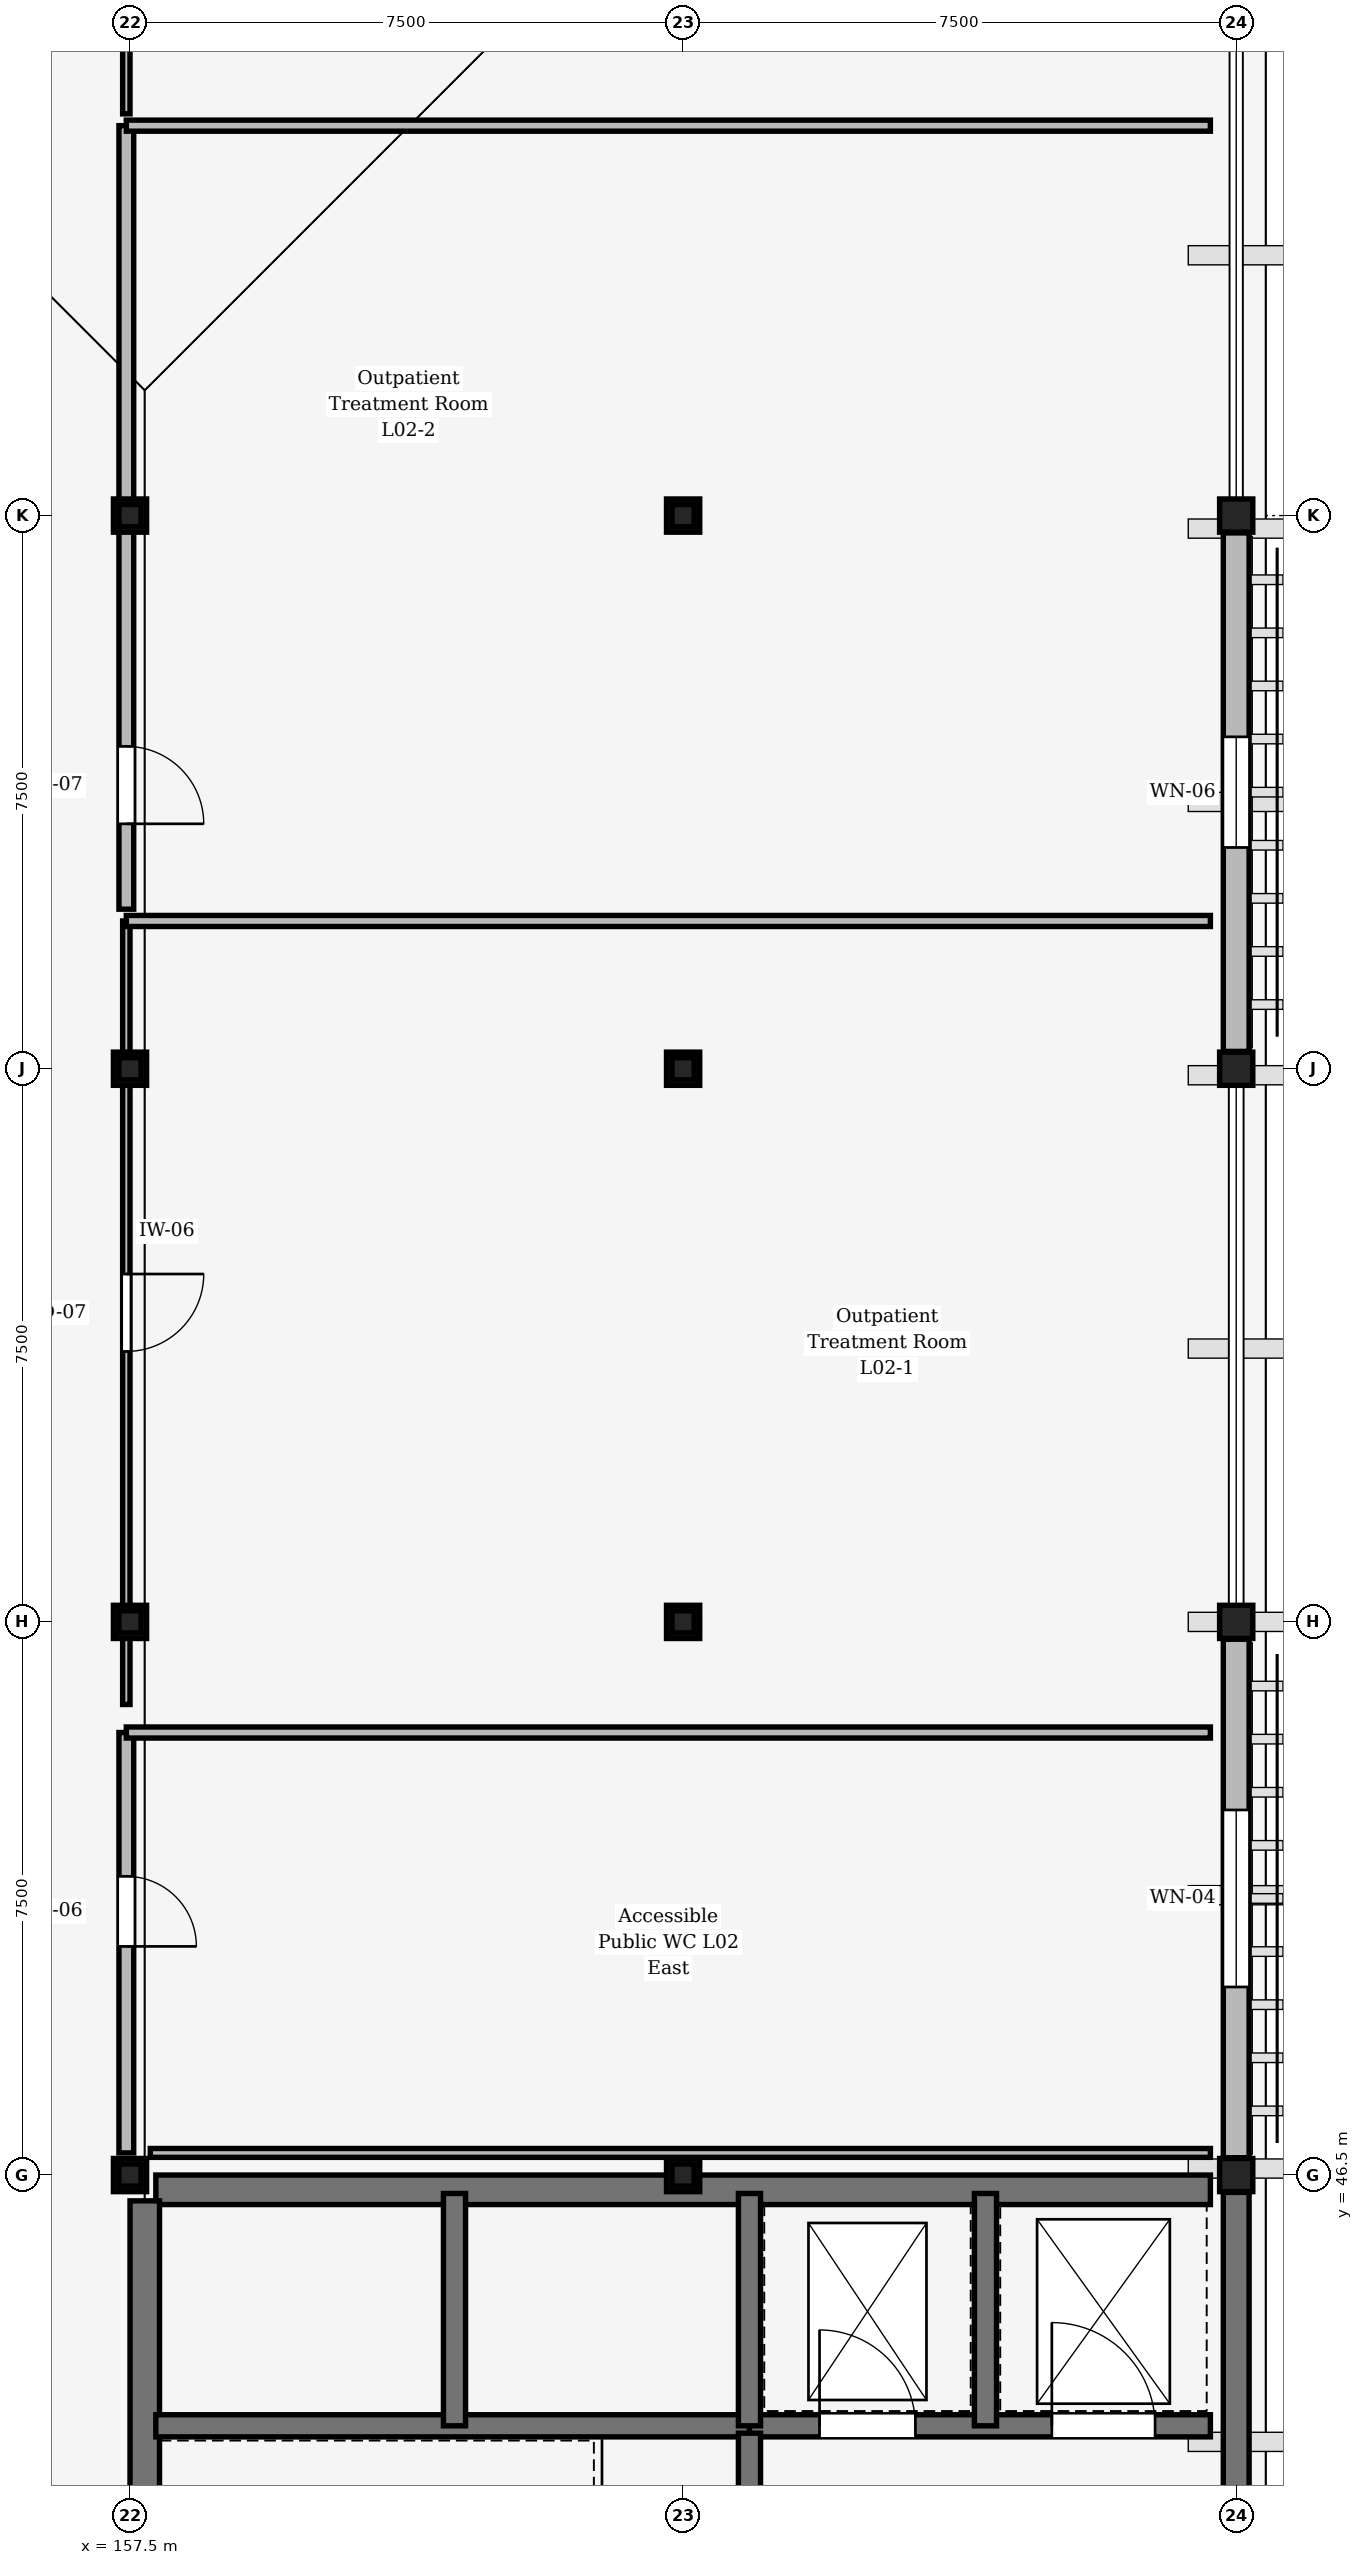
"""IFC4 building model, lengths in metres.
Left out: names, types, materials, properties, quantities, classifications, styles, units other than length and angle.
Written with IfcOpenShell. Run it as: python <this file> out.ifc"""

import sys

from ifc_helpers import new_model, si_unit, direction, frame, frame_2d, origin, origin_2d, place, context, subcontext, project, spatial, rectangle, i_section, extrude, element, fill, save


model = new_model("IFC4")
c1 = context("Model", 3, precision=1e-05, world=origin(), true_north=direction((0.0, 1.0)))
c2 = subcontext(c1, "Body", "Model", "MODEL_VIEW")
j1 = project(units=[si_unit("LENGTHUNIT", "METRE"), si_unit("PLANEANGLEUNIT", "RADIAN")], contexts=[c1])
p1 = place(None, origin())
s1 = spatial("IfcSite", under=j1, at=p1, CompositionType="ELEMENT")
p2 = place(p1, origin())
s2 = spatial("IfcBuilding", under=s1, at=p2, CompositionType="ELEMENT")
p3 = place(p2, frame((0.0, 0.0, 9.3)))
s3 = spatial("IfcBuildingStorey", under=s2, at=p3, CompositionType="ELEMENT", Elevation=9.3)
for number, where, z_axis, x_axis in (
    (1, (157.5, 46.5, 0.0), (0.0, 0.0, 1.0), (1.0, 0.0, 0.0)),
    (2, (157.5, 54.0, 0.0), (0.0, 0.0, 1.0), (1.0, 0.0, 0.0)),
    (3, (157.5, 61.5, 0.0), (0.0, 0.0, 1.0), (1.0, 0.0, 0.0)),
    (4, (157.5, 69.0, 0.0), (0.0, 0.0, 1.0), (1.0, 0.0, 0.0)),
    (5, (165.0, 46.5, 0.0), (0.0, 0.0, 1.0), (1.0, 0.0, 0.0)),
    (6, (165.0, 54.0, 0.0), (0.0, 0.0, 1.0), (1.0, 0.0, 0.0)),
    (7, (165.0, 61.5, 0.0), (0.0, 0.0, 1.0), (1.0, 0.0, 0.0)),
    (8, (165.0, 69.0, 0.0), (0.0, 0.0, 1.0), (1.0, 0.0, 0.0)),
    (9, (172.5, 46.5, 0.0), (0.0, 0.0, 1.0), (1.0, 0.0, 0.0)),
    (10, (172.5, 54.0, 0.0), (0.0, 0.0, 1.0), (1.0, 0.0, 0.0)),
    (11, (172.5, 61.5, 0.0), (0.0, 0.0, 1.0), (1.0, 0.0, 0.0)),
    (12, (172.5, 69.0, 0.0), (0.0, 0.0, 1.0), (1.0, 0.0, 0.0)),
):
    element("IfcColumn", number, at=place(p3, frame(where, z_axis=z_axis, x_axis=x_axis)), inside=s3, PredefinedType="COLUMN", context=c2, shape_type="SweptSolid", body=[
        extrude(rectangle(XDim=0.45, YDim=0.45, at=origin_2d()), origin(), (0.0, 0.0, 1.0), 4.8),
    ])
for number, where, z_axis, x_axis in (
    (13, (157.5, 46.5, 4.8), (0.0, 0.0, 1.0), (1.0, 0.0, 0.0)),
    (14, (157.5, 54.0, 4.8), (0.0, 0.0, 1.0), (1.0, 0.0, 0.0)),
    (15, (157.5, 61.5, 4.8), (0.0, 0.0, 1.0), (1.0, 0.0, 0.0)),
    (16, (157.5, 69.0, 4.8), (0.0, 0.0, 1.0), (1.0, 0.0, 0.0)),
):
    element("IfcColumn", number, at=place(p3, frame(where, z_axis=z_axis, x_axis=x_axis)), inside=s3, PredefinedType="COLUMN", context=c2, shape_type="SweptSolid", body=[
        extrude(i_section(OverallWidth=0.3, OverallDepth=0.3, WebThickness=0.011, FlangeThickness=0.019, FilletRadius=0.027, at=origin_2d()), origin(), (0.0, 0.0, 1.0), 3.714),
    ])
for number, where, z_axis, x_axis in (
    (17, (165.0, 46.5, 4.8), (0.0, 0.0, 1.0), (1.0, 0.0, 0.0)),
    (18, (165.0, 54.0, 4.8), (0.0, 0.0, 1.0), (1.0, 0.0, 0.0)),
    (19, (165.0, 61.5, 4.8), (0.0, 0.0, 1.0), (1.0, 0.0, 0.0)),
    (20, (165.0, 69.0, 4.8), (0.0, 0.0, 1.0), (1.0, 0.0, 0.0)),
):
    element("IfcColumn", number, at=place(p3, frame(where, z_axis=z_axis, x_axis=x_axis)), inside=s3, PredefinedType="COLUMN", context=c2, shape_type="SweptSolid", body=[
        extrude(i_section(OverallWidth=0.3, OverallDepth=0.3, WebThickness=0.011, FlangeThickness=0.019, FilletRadius=0.027, at=origin_2d()), origin(), (0.0, 0.0, 1.0), 1.97),
    ])
p4 = place(p3, frame((172.5, 46.265, 0.0), z_axis=(0.0, 0.0, 1.0), x_axis=(0.0, -1.0, 0.0)))
e21 = element("IfcWall", 21, at=p4, inside=s3, PredefinedType="SHEAR", context=c2, shape_type="SweptSolid", body=[
    extrude(rectangle(XDim=7.03, YDim=0.35, at=frame_2d((3.515, 0.0))), origin(), (0.0, 0.0, 1.0), 4.55),
])
p5 = place(p3, frame((172.5, 53.765, 0.0), z_axis=(0.0, 0.0, 1.0), x_axis=(0.0, -1.0, 0.0)))
e22 = element("IfcWall", 22, at=p5, inside=s3, PredefinedType="STANDARD", context=c2, shape_type="SweptSolid", body=[
    extrude(rectangle(XDim=7.03, YDim=0.35, at=frame_2d((3.515, 0.0))), origin(), (0.0, 0.0, 1.0), 4.55),
])
p6 = place(p5, frame((2.315, 0.0, 0.9)))
e23 = element("IfcOpeningElement", 23, at=p6, cuts=e22, PredefinedType="OPENING", context=c2, shape_type="SweptSolid", body=[
    extrude(rectangle(XDim=2.4, YDim=2.5, at=frame_2d((1.2, 1.25))), frame((0.0, 0.185, 0.0), z_axis=(0.0, -1.0, 0.0), x_axis=(1.0, 0.0, 0.0)), (0.0, 0.0, 1.0), 0.37),
])
p7 = place(p3, frame((172.5, 68.765, 0.0), z_axis=(0.0, 0.0, 1.0), x_axis=(0.0, -1.0, 0.0)))
e24 = element("IfcWall", 24, at=p7, inside=s3, PredefinedType="STANDARD", context=c2, shape_type="SweptSolid", body=[
    extrude(rectangle(XDim=7.03, YDim=0.35, at=frame_2d((3.515, 0.0))), origin(), (0.0, 0.0, 1.0), 4.55),
])
p8 = place(p7, frame((2.765, 0.0, 0.9)))
e25 = element("IfcOpeningElement", 25, at=p8, cuts=e24, PredefinedType="OPENING", context=c2, shape_type="SweptSolid", body=[
    extrude(rectangle(XDim=1.5, YDim=2.1, at=frame_2d((0.75, 1.05))), frame((0.0, 0.185, 0.0), z_axis=(0.0, -1.0, 0.0), x_axis=(1.0, 0.0, 0.0)), (0.0, 0.0, 1.0), 0.37),
])
p9 = place(p3, frame((157.85, 46.3, 0.0), z_axis=(0.0, 0.0, 1.0), x_axis=(1.0, 0.0, 0.0)))
e26 = element("IfcWall", 26, at=p9, inside=s3, PredefinedType="SHEAR", context=c2, shape_type="SweptSolid", body=[
    extrude(rectangle(XDim=14.3, YDim=0.4, at=frame_2d((7.15, 0.0))), origin(), (0.0, 0.0, 1.0), 4.55),
])
p10 = place(p3, frame((157.7, 39.35, 0.0), z_axis=(0.0, 0.0, 1.0), x_axis=(0.0, 1.0, 0.0)))
e27 = element("IfcWall", 27, at=p10, inside=s3, PredefinedType="SHEAR", context=c2, shape_type="SweptSolid", body=[
    extrude(rectangle(XDim=6.8, YDim=0.4, at=frame_2d((3.4, 0.0))), origin(), (0.0, 0.0, 1.0), 4.55),
])
p11 = place(p3, frame((157.85, 43.1, 0.0), z_axis=(0.0, 0.0, 1.0), x_axis=(1.0, 0.0, 0.0)))
e28 = element("IfcWall", 28, at=p11, inside=s3, PredefinedType="SHEAR", context=c2, shape_type="SweptSolid", body=[
    extrude(rectangle(XDim=8.05, YDim=0.3, at=frame_2d((4.025, 0.0))), origin(), (0.0, 0.0, 1.0), 4.55),
])
p12 = place(p3, frame((165.9, 43.1, 0.0), z_axis=(0.0, 0.0, 1.0), x_axis=(1.0, 0.0, 0.0)))
e29 = element("IfcWall", 29, at=p12, inside=s3, PredefinedType="SHEAR", context=c2, shape_type="SweptSolid", body=[
    extrude(rectangle(XDim=6.25, YDim=0.3, at=frame_2d((3.125, 0.0))), origin(), (0.0, 0.0, 1.0), 4.55),
])
p13 = place(p12, frame((0.95, 0.0, 0.0)))
e30 = element("IfcOpeningElement", 30, at=p13, cuts=e29, PredefinedType="OPENING", context=c2, shape_type="SweptSolid", body=[
    extrude(rectangle(XDim=1.3, YDim=2.2, at=frame_2d((0.65, 1.1))), frame((0.0, 0.16, 0.0), z_axis=(0.0, -1.0, 0.0), x_axis=(1.0, 0.0, 0.0)), (0.0, 0.0, 1.0), 0.32),
])
p14 = place(p12, frame((4.1, 0.0, 0.0)))
e31 = element("IfcOpeningElement", 31, at=p14, cuts=e29, PredefinedType="OPENING", context=c2, shape_type="SweptSolid", body=[
    extrude(rectangle(XDim=1.4, YDim=2.25, at=frame_2d((0.7, 1.125))), frame((0.0, 0.16, 0.0), z_axis=(0.0, -1.0, 0.0), x_axis=(1.0, 0.0, 0.0)), (0.0, 0.0, 1.0), 0.32),
])
p15 = place(p3, frame((165.9, 43.0, 0.0), z_axis=(0.0, 0.0, 1.0), x_axis=(0.0, -1.0, 0.0)))
e32 = element("IfcWall", 32, at=p15, inside=s3, PredefinedType="SHEAR", context=c2, shape_type="SweptSolid", body=[
    extrude(rectangle(XDim=3.65, YDim=0.3, at=frame_2d((1.825, 0.0))), origin(), (0.0, 0.0, 1.0), 4.55),
])
p16 = place(p15, frame((1.22, 0.0, 0.0)))
e33 = element("IfcOpeningElement", 33, at=p16, cuts=e32, PredefinedType="OPENING", context=c2, shape_type="SweptSolid", body=[
    extrude(rectangle(XDim=1.2, YDim=2.25, at=frame_2d((0.6, 1.125))), frame((0.0, 0.16, 0.0), z_axis=(0.0, -1.0, 0.0), x_axis=(1.0, 0.0, 0.0)), (0.0, 0.0, 1.0), 0.32),
])
for number, where, z_axis, x_axis in (
    (34, (161.9, 43.1, 0.0), (0.0, 0.0, 1.0), (0.0, 1.0, 0.0)),
    (35, (165.9, 43.1, 0.0), (0.0, 0.0, 1.0), (0.0, 1.0, 0.0)),
    (36, (169.1, 43.1, 0.0), (0.0, 0.0, 1.0), (0.0, 1.0, 0.0)),
):
    element("IfcWall", number, at=place(p3, frame(where, z_axis=z_axis, x_axis=x_axis)), inside=s3, PredefinedType="SHEAR", context=c2, shape_type="SweptSolid", body=[
        extrude(rectangle(XDim=3.15, YDim=0.3, at=frame_2d((1.575, 0.0))), origin(), (0.0, 0.0, 1.0), 4.55),
    ])
p17 = place(p3, frame((157.45, 52.5, 0.0), z_axis=(0.0, 0.0, 1.0), x_axis=(0.0, -1.0, 0.0)))
e37 = element("IfcWall", 37, at=p17, inside=s3, PredefinedType="STANDARD", context=c2, shape_type="SweptSolid", body=[
    extrude(rectangle(XDim=5.7, YDim=0.2, at=frame_2d((2.85, 0.0))), origin(), (0.0, 0.0, 1.0), 4.535),
])
p18 = place(p17, frame((1.95, 0.0, 0.0)))
e38 = element("IfcOpeningElement", 38, at=p18, cuts=e37, PredefinedType="OPENING", context=c2, shape_type="SweptSolid", body=[
    extrude(rectangle(XDim=0.95, YDim=2.15, at=frame_2d((0.475, 1.075))), frame((0.0, 0.11, 0.0), z_axis=(0.0, -1.0, 0.0), x_axis=(1.0, 0.0, 0.0)), (0.0, 0.0, 1.0), 0.22),
])
p19 = place(p3, frame((157.45, 63.503, 0.0), z_axis=(0.0, 0.0, 1.0), x_axis=(0.0, -1.0, 0.0)))
e39 = element("IfcWall", 39, at=p19, inside=s3, PredefinedType="PARTITIONING", context=c2, shape_type="SweptSolid", body=[
    extrude(rectangle(XDim=10.624, YDim=0.1, at=frame_2d((5.312, 0.0))), origin(), (0.0, 0.0, 1.0), 4.535),
])
p20 = place(p19, frame((4.787, 0.0, 0.0)))
e40 = element("IfcOpeningElement", 40, at=p20, cuts=e39, PredefinedType="OPENING", context=c2, shape_type="SweptSolid", body=[
    extrude(rectangle(XDim=1.05, YDim=2.2, at=frame_2d((0.525, 1.1))), frame((0.0, 0.06, 0.0), z_axis=(0.0, -1.0, 0.0), x_axis=(1.0, 0.0, 0.0)), (0.0, 0.0, 1.0), 0.12),
])
p21 = place(p3, frame((157.45, 74.287, 0.0), z_axis=(0.0, 0.0, 1.0), x_axis=(0.0, -1.0, 0.0)))
e41 = element("IfcWall", 41, at=p21, inside=s3, PredefinedType="STANDARD", context=c2, shape_type="SweptSolid", body=[
    extrude(rectangle(XDim=10.623, YDim=0.2, at=frame_2d((5.312, 0.0))), origin(), (0.0, 0.0, 1.0), 4.535),
])
p22 = place(p21, frame((8.416, 0.0, 0.0)))
e42 = element("IfcOpeningElement", 42, at=p22, cuts=e41, PredefinedType="OPENING", context=c2, shape_type="SweptSolid", body=[
    extrude(rectangle(XDim=1.05, YDim=2.2, at=frame_2d((0.525, 1.1))), frame((0.0, 0.11, 0.0), z_axis=(0.0, -1.0, 0.0), x_axis=(1.0, 0.0, 0.0)), (0.0, 0.0, 1.0), 0.22),
])
p23 = place(p3, frame((157.45, 85.07, 0.0), z_axis=(0.0, 0.0, 1.0), x_axis=(0.0, -1.0, 0.0)))
e43 = element("IfcWall", 43, at=p23, inside=s3, PredefinedType="PARTITIONING", context=c2, shape_type="SweptSolid", body=[
    extrude(rectangle(XDim=10.623, YDim=0.1, at=frame_2d((5.312, 0.0))), origin(), (0.0, 0.0, 1.0), 4.535),
])
p24 = place(p23, frame((3.879, 0.0, 0.0)))
e44 = element("IfcOpeningElement", 44, at=p24, cuts=e43, PredefinedType="OPENING", context=c2, shape_type="SweptSolid", body=[
    extrude(rectangle(XDim=1.05, YDim=2.2, at=frame_2d((0.525, 1.1))), frame((0.0, 0.06, 0.0), z_axis=(0.0, -1.0, 0.0), x_axis=(1.0, 0.0, 0.0)), (0.0, 0.0, 1.0), 0.12),
])
for number, where, z_axis, x_axis in (
    (45, (157.45, 52.5, 0.0), (0.0, 0.0, 1.0), (1.0, 0.0, 0.0)),
    (46, (157.45, 63.503, 0.0), (0.0, 0.0, 1.0), (1.0, 0.0, 0.0)),
    (47, (157.45, 74.287, 0.0), (0.0, 0.0, 1.0), (1.0, 0.0, 0.0)),
):
    element("IfcWall", number, at=place(p3, frame(where, z_axis=z_axis, x_axis=x_axis)), inside=s3, PredefinedType="PARTITIONING", context=c2, shape_type="SweptSolid", body=[
        extrude(rectangle(XDim=14.7, YDim=0.15, at=frame_2d((7.35, 0.0))), origin(), (0.0, 0.0, 1.0), 4.535),
    ])
p25 = place(p3, frame((157.775, 46.8, 0.0), z_axis=(0.0, 0.0, 1.0), x_axis=(1.0, 0.0, 0.0)))
e48 = element("IfcWall", 48, at=p25, inside=s3, PredefinedType="PARTITIONING", context=c2, shape_type="SweptSolid", body=[
    extrude(rectangle(XDim=14.375, YDim=0.12, at=frame_2d((7.188, 0.0))), origin(), (0.0, 0.0, 1.0), 4.535),
])
p26 = place(p6, origin())
e49 = element("IfcWindow", 49, at=p26, inside=s3, PartitioningType="SINGLE_PANEL", PredefinedType="WINDOW", context=c2, shape_type="SweptSolid", body=[
    extrude(rectangle(XDim=2.4, YDim=2.5, at=frame_2d((1.2, 1.25))), frame((0.0, 0.03, 0.0), z_axis=(0.0, -1.0, 0.0), x_axis=(1.0, 0.0, 0.0)), (0.0, 0.0, 1.0), 0.06),
])
fill(e23, e49)
p27 = place(p8, origin())
e50 = element("IfcWindow", 50, at=p27, inside=s3, PartitioningType="SINGLE_PANEL", PredefinedType="WINDOW", context=c2, shape_type="SweptSolid", body=[
    extrude(rectangle(XDim=1.5, YDim=2.1, at=frame_2d((0.75, 1.05))), frame((0.0, 0.03, 0.0), z_axis=(0.0, -1.0, 0.0), x_axis=(1.0, 0.0, 0.0)), (0.0, 0.0, 1.0), 0.06),
])
fill(e25, e50)
p28 = place(p13, origin())
e51 = element("IfcDoor", 51, at=p28, inside=s3, OperationType="DOUBLE_DOOR_SLIDING", PredefinedType="DOOR", context=c2, shape_type="SweptSolid", body=[
    extrude(rectangle(XDim=1.3, YDim=2.2, at=frame_2d((0.65, 1.1))), frame((0.0, 0.025, 0.0), z_axis=(0.0, -1.0, 0.0), x_axis=(1.0, 0.0, 0.0)), (0.0, 0.0, 1.0), 0.05),
])
fill(e30, e51)
p29 = place(p14, origin())
e52 = element("IfcDoor", 52, at=p29, inside=s3, OperationType="DOUBLE_DOOR_SLIDING", PredefinedType="DOOR", context=c2, shape_type="SweptSolid", body=[
    extrude(rectangle(XDim=1.4, YDim=2.25, at=frame_2d((0.7, 1.125))), frame((0.0, 0.025, 0.0), z_axis=(0.0, -1.0, 0.0), x_axis=(1.0, 0.0, 0.0)), (0.0, 0.0, 1.0), 0.05),
])
fill(e31, e52)
p30 = place(p18, origin())
e53 = element("IfcDoor", 53, at=p30, inside=s3, OperationType="SINGLE_SWING_RIGHT", PredefinedType="DOOR", context=c2, shape_type="SweptSolid", body=[
    extrude(rectangle(XDim=0.95, YDim=2.15, at=frame_2d((0.475, 1.075))), frame((0.0, 0.025, 0.0), z_axis=(0.0, -1.0, 0.0), x_axis=(1.0, 0.0, 0.0)), (0.0, 0.0, 1.0), 0.05),
])
fill(e38, e53)
p31 = place(p20, origin())
e54 = element("IfcDoor", 54, at=p31, inside=s3, OperationType="SINGLE_SWING_LEFT", PredefinedType="DOOR", context=c2, shape_type="SweptSolid", body=[
    extrude(rectangle(XDim=1.05, YDim=2.2, at=frame_2d((0.525, 1.1))), frame((0.0, 0.025, 0.0), z_axis=(0.0, -1.0, 0.0), x_axis=(1.0, 0.0, 0.0)), (0.0, 0.0, 1.0), 0.05),
])
fill(e40, e54)
p32 = place(p22, origin())
e55 = element("IfcDoor", 55, at=p32, inside=s3, OperationType="SINGLE_SWING_RIGHT", PredefinedType="DOOR", context=c2, shape_type="SweptSolid", body=[
    extrude(rectangle(XDim=1.05, YDim=2.2, at=frame_2d((0.525, 1.1))), frame((0.0, 0.025, 0.0), z_axis=(0.0, -1.0, 0.0), x_axis=(1.0, 0.0, 0.0)), (0.0, 0.0, 1.0), 0.05),
])
fill(e42, e55)
save(model, sys.argv[1])
